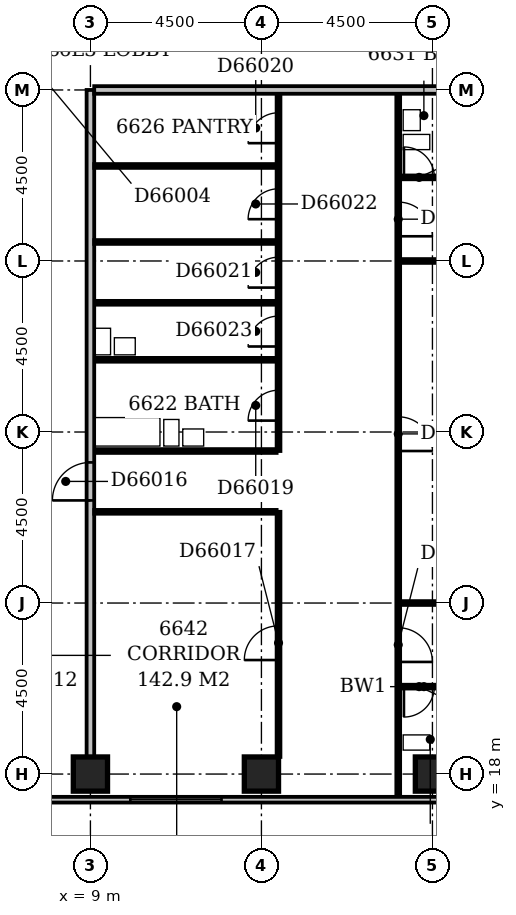
"""IFC4 building model, lengths in metres.
Left out: names, types, materials, properties, quantities, classifications, styles, units other than length and angle.
Written with IfcOpenShell. Run it as: python <this file> out.ifc"""

import sys

from ifc_helpers import new_model, si_unit, direction, frame, frame_2d, origin, origin_2d, place, context, subcontext, project, spatial, rectangle, extrude, element, fill, save


model = new_model("IFC4")
c1 = context("Model", 3, precision=1e-05, world=origin(), true_north=direction((0.0, 1.0)))
c2 = subcontext(c1, "Body", "Model", "MODEL_VIEW")
j1 = project(units=[si_unit("LENGTHUNIT", "METRE"), si_unit("PLANEANGLEUNIT", "RADIAN")], contexts=[c1])
p1 = place(None, origin())
s1 = spatial("IfcSite", under=j1, at=p1, CompositionType="ELEMENT")
p2 = place(p1, origin())
s2 = spatial("IfcBuilding", under=s1, at=p2, CompositionType="ELEMENT")
p3 = place(p2, frame((0.0, 0.0, 254.6)))
s3 = spatial("IfcBuildingStorey", under=s2, at=p3, CompositionType="ELEMENT", Elevation=254.6)
for number, where, z_axis, x_axis in (
    (1, (9.0, 18.0, -0.3), (0.0, 0.0, 1.0), (1.0, 0.0, 0.0)),
    (2, (13.5, 18.0, -0.3), (0.0, 0.0, 1.0), (1.0, 0.0, 0.0)),
    (3, (18.0, 18.0, -0.3), (0.0, 0.0, 1.0), (1.0, 0.0, 0.0)),
):
    element("IfcColumn", number, at=place(p3, frame(where, z_axis=z_axis, x_axis=x_axis)), inside=s3, PredefinedType="COLUMN", context=c2, shape_type="SweptSolid", body=[
        extrude(rectangle(XDim=0.9, YDim=0.9, at=origin_2d()), origin(), (0.0, 0.0, 1.0), 3.45),
    ])
p4 = place(p3, frame((3.9, 17.325, 0.0), z_axis=(0.0, 0.0, 1.0), x_axis=(1.0, 0.0, 0.0)))
e4 = element("IfcWall", 4, at=p4, inside=s3, PredefinedType="STANDARD", context=c2, shape_type="SweptSolid", body=[
    extrude(rectangle(XDim=19.35, YDim=0.15, at=frame_2d((9.675, 0.0))), origin(), (0.0, 0.0, 1.0), 2.7),
])
p5 = place(p4, frame((6.15, 0.0, 0.6)))
e5 = element("IfcOpeningElement", 5, at=p5, cuts=e4, PredefinedType="OPENING", context=c2, shape_type="SweptSolid", body=[
    extrude(rectangle(XDim=2.4, YDim=1.8, at=frame_2d((1.2, 0.9))), frame((0.0, 0.087, 0.0), z_axis=(0.0, -1.0, 0.0), x_axis=(1.0, 0.0, 0.0)), (0.0, 0.0, 1.0), 0.174),
])
p6 = place(p4, frame((15.15, 0.0, 0.6)))
e6 = element("IfcOpeningElement", 6, at=p6, cuts=e4, PredefinedType="OPENING", context=c2, shape_type="SweptSolid", body=[
    extrude(rectangle(XDim=2.4, YDim=1.8, at=frame_2d((1.2, 0.9))), frame((0.0, 0.087, 0.0), z_axis=(0.0, -1.0, 0.0), x_axis=(1.0, 0.0, 0.0)), (0.0, 0.0, 1.0), 0.174),
])
p7 = place(p3, frame((17.1, 17.4, 0.0), z_axis=(0.0, 0.0, 1.0), x_axis=(0.0, 1.0, 0.0)))
e7 = element("IfcWall", 7, at=p7, inside=s3, PredefinedType="PARTITIONING", context=c2, shape_type="SweptSolid", body=[
    extrude(rectangle(XDim=18.5, YDim=0.1, at=frame_2d((9.25, 0.0))), origin(), (0.0, 0.0, 1.0), 3.15),
])
p8 = place(p7, frame((3.55, 0.0, 0.0)))
e8 = element("IfcOpeningElement", 8, at=p8, cuts=e7, PredefinedType="OPENING", context=c2, shape_type="SweptSolid", body=[
    extrude(rectangle(XDim=0.9, YDim=2.1, at=frame_2d((0.45, 1.05))), frame((0.0, 0.062, 0.0), z_axis=(0.0, -1.0, 0.0), x_axis=(1.0, 0.0, 0.0)), (0.0, 0.0, 1.0), 0.124),
])
p9 = place(p7, frame((9.1, 0.0, 0.0)))
e9 = element("IfcOpeningElement", 9, at=p9, cuts=e7, PredefinedType="OPENING", context=c2, shape_type="SweptSolid", body=[
    extrude(rectangle(XDim=0.9, YDim=2.1, at=frame_2d((0.45, 1.05))), frame((0.0, 0.062, 0.0), z_axis=(0.0, -1.0, 0.0), x_axis=(1.0, 0.0, 0.0)), (0.0, 0.0, 1.0), 0.124),
])
p10 = place(p7, frame((14.75, 0.0, 0.0)))
e10 = element("IfcOpeningElement", 10, at=p10, cuts=e7, PredefinedType="OPENING", context=c2, shape_type="SweptSolid", body=[
    extrude(rectangle(XDim=0.9, YDim=2.1, at=frame_2d((0.45, 1.05))), frame((0.0, 0.062, 0.0), z_axis=(0.0, -1.0, 0.0), x_axis=(1.0, 0.0, 0.0)), (0.0, 0.0, 1.0), 0.124),
])
p11 = place(p3, frame((9.0, 18.45, 0.0), z_axis=(0.0, 0.0, 1.0), x_axis=(0.0, 1.0, 0.0)))
e11 = element("IfcWall", 11, at=p11, inside=s3, PredefinedType="PARTITIONING", context=c2, shape_type="SweptSolid", body=[
    extrude(rectangle(XDim=17.55, YDim=0.2, at=frame_2d((8.775, 0.0))), origin(), (0.0, 0.0, 1.0), 3.15),
])
p12 = place(p11, frame((6.75, 0.0, 0.0)))
e12 = element("IfcOpeningElement", 12, at=p12, cuts=e11, PredefinedType="OPENING", context=c2, shape_type="SweptSolid", body=[
    extrude(rectangle(XDim=1.0, YDim=2.1, at=frame_2d((0.5, 1.05))), frame((0.0, 0.112, 0.0), z_axis=(0.0, -1.0, 0.0), x_axis=(1.0, 0.0, 0.0)), (0.0, 0.0, 1.0), 0.224),
])
p13 = place(p3, frame((13.95, 18.45, 0.0), z_axis=(0.0, 0.0, 1.0), x_axis=(0.0, 1.0, 0.0)))
e13 = element("IfcWall", 13, at=p13, inside=s3, PredefinedType="PARTITIONING", context=c2, shape_type="SweptSolid", body=[
    extrude(rectangle(XDim=6.45, YDim=0.1, at=frame_2d((3.225, 0.0))), origin(), (0.0, 0.0, 1.0), 3.15),
])
p14 = place(p13, frame((2.55, 0.0, 0.0)))
e14 = element("IfcOpeningElement", 14, at=p14, cuts=e13, PredefinedType="OPENING", context=c2, shape_type="SweptSolid", body=[
    extrude(rectangle(XDim=0.9, YDim=2.1, at=frame_2d((0.45, 1.05))), frame((0.0, 0.062, 0.0), z_axis=(0.0, -1.0, 0.0), x_axis=(1.0, 0.0, 0.0)), (0.0, 0.0, 1.0), 0.124),
])
p15 = place(p3, frame((17.15, 20.3, 0.0), z_axis=(0.0, 0.0, 1.0), x_axis=(1.0, 0.0, 0.0)))
e15 = element("IfcWall", 15, at=p15, inside=s3, PredefinedType="PLUMBINGWALL", context=c2, shape_type="SweptSolid", body=[
    extrude(rectangle(XDim=1.25, YDim=0.1, at=frame_2d((0.625, 0.0))), origin(), (0.0, 0.0, 1.0), 3.15),
])
p16 = place(p15, frame((0.1, 0.0, 0.0)))
e16 = element("IfcOpeningElement", 16, at=p16, cuts=e15, PredefinedType="OPENING", context=c2, shape_type="SweptSolid", body=[
    extrude(rectangle(XDim=0.8, YDim=2.1, at=frame_2d((0.4, 1.05))), frame((0.0, 0.062, 0.0), z_axis=(0.0, -1.0, 0.0), x_axis=(1.0, 0.0, 0.0)), (0.0, 0.0, 1.0), 0.124),
])
p17 = place(p3, frame((17.15, 22.5, 0.0), z_axis=(0.0, 0.0, 1.0), x_axis=(1.0, 0.0, 0.0)))
e17 = element("IfcWall", 17, at=p17, inside=s3, PredefinedType="PARTITIONING", context=c2, shape_type="SweptSolid", body=[
    extrude(rectangle(XDim=4.9, YDim=0.1, at=frame_2d((2.45, 0.0))), origin(), (0.0, 0.0, 1.0), 3.15),
])
p18 = place(p3, frame((9.1, 24.9, 0.0), z_axis=(0.0, 0.0, 1.0), x_axis=(1.0, 0.0, 0.0)))
e18 = element("IfcWall", 18, at=p18, inside=s3, PredefinedType="PARTITIONING", context=c2, shape_type="SweptSolid", body=[
    extrude(rectangle(XDim=4.8, YDim=0.1, at=frame_2d((2.4, 0.0))), origin(), (0.0, 0.0, 1.0), 3.15),
])
p19 = place(p3, frame((9.1, 26.5, 0.0), z_axis=(0.0, 0.0, 1.0), x_axis=(1.0, 0.0, 0.0)))
e19 = element("IfcWall", 19, at=p19, inside=s3, PredefinedType="PLUMBINGWALL", context=c2, shape_type="SweptSolid", body=[
    extrude(rectangle(XDim=4.8, YDim=0.1, at=frame_2d((2.4, 0.0))), origin(), (0.0, 0.0, 1.0), 2.55),
])
p20 = place(p3, frame((13.95, 26.5, 0.0), z_axis=(0.0, 0.0, 1.0), x_axis=(0.0, 1.0, 0.0)))
e20 = element("IfcWall", 20, at=p20, inside=s3, PredefinedType="PARTITIONING", context=c2, shape_type="SweptSolid", body=[
    extrude(rectangle(XDim=9.4, YDim=0.1, at=frame_2d((4.7, 0.0))), origin(), (0.0, 0.0, 1.0), 3.15),
])
p21 = place(p20, frame((0.8, 0.0, 0.0)))
e21 = element("IfcOpeningElement", 21, at=p21, cuts=e20, PredefinedType="OPENING", context=c2, shape_type="SweptSolid", body=[
    extrude(rectangle(XDim=0.8, YDim=2.1, at=frame_2d((0.4, 1.05))), frame((0.0, 0.062, 0.0), z_axis=(0.0, -1.0, 0.0), x_axis=(1.0, 0.0, 0.0)), (0.0, 0.0, 1.0), 0.124),
])
p22 = place(p20, frame((8.1, 0.0, 0.0)))
e22 = element("IfcOpeningElement", 22, at=p22, cuts=e20, PredefinedType="OPENING", context=c2, shape_type="SweptSolid", body=[
    extrude(rectangle(XDim=0.8, YDim=2.1, at=frame_2d((0.4, 1.05))), frame((0.0, 0.062, 0.0), z_axis=(0.0, -1.0, 0.0), x_axis=(1.0, 0.0, 0.0)), (0.0, 0.0, 1.0), 0.124),
])
p23 = place(p20, frame((4.3, 0.0, 0.0)))
e23 = element("IfcOpeningElement", 23, at=p23, cuts=e20, PredefinedType="OPENING", context=c2, shape_type="SweptSolid", body=[
    extrude(rectangle(XDim=0.8, YDim=2.1, at=frame_2d((0.4, 1.05))), frame((0.0, 0.062, 0.0), z_axis=(0.0, -1.0, 0.0), x_axis=(1.0, 0.0, 0.0)), (0.0, 0.0, 1.0), 0.124),
])
p24 = place(p20, frame((6.1, 0.0, 0.0)))
e24 = element("IfcOpeningElement", 24, at=p24, cuts=e20, PredefinedType="OPENING", context=c2, shape_type="SweptSolid", body=[
    extrude(rectangle(XDim=0.8, YDim=2.1, at=frame_2d((0.4, 1.05))), frame((0.0, 0.062, 0.0), z_axis=(0.0, -1.0, 0.0), x_axis=(1.0, 0.0, 0.0)), (0.0, 0.0, 1.0), 0.124),
])
p25 = place(p20, frame((2.75, 0.0, 0.0)))
e25 = element("IfcOpeningElement", 25, at=p25, cuts=e20, PredefinedType="OPENING", context=c2, shape_type="SweptSolid", body=[
    extrude(rectangle(XDim=0.8, YDim=2.1, at=frame_2d((0.4, 1.05))), frame((0.0, 0.062, 0.0), z_axis=(0.0, -1.0, 0.0), x_axis=(1.0, 0.0, 0.0)), (0.0, 0.0, 1.0), 0.124),
])
for number, where, z_axis, x_axis in (
    (26, (9.1, 28.9, 0.0), (0.0, 0.0, 1.0), (1.0, 0.0, 0.0)),
    (27, (9.1, 30.4, 0.0), (0.0, 0.0, 1.0), (1.0, 0.0, 0.0)),
):
    element("IfcWall", number, at=place(p3, frame(where, z_axis=z_axis, x_axis=x_axis)), inside=s3, PredefinedType="PLUMBINGWALL", context=c2, shape_type="SweptSolid", body=[
        extrude(rectangle(XDim=4.8, YDim=0.1, at=frame_2d((2.4, 0.0))), origin(), (0.0, 0.0, 1.0), 3.15),
    ])
p26 = place(p3, frame((17.15, 31.5, 0.0), z_axis=(0.0, 0.0, 1.0), x_axis=(1.0, 0.0, 0.0)))
e28 = element("IfcWall", 28, at=p26, inside=s3, PredefinedType="PARTITIONING", context=c2, shape_type="SweptSolid", body=[
    extrude(rectangle(XDim=4.9, YDim=0.1, at=frame_2d((2.45, 0.0))), origin(), (0.0, 0.0, 1.0), 3.15),
])
p27 = place(p3, frame((9.1, 32.0, 0.0), z_axis=(0.0, 0.0, 1.0), x_axis=(1.0, 0.0, 0.0)))
e29 = element("IfcWall", 29, at=p27, inside=s3, PredefinedType="PARTITIONING", context=c2, shape_type="SweptSolid", body=[
    extrude(rectangle(XDim=4.8, YDim=0.1, at=frame_2d((2.4, 0.0))), origin(), (0.0, 0.0, 1.0), 3.15),
])
p28 = place(p3, frame((17.15, 33.7, 0.0), z_axis=(0.0, 0.0, 1.0), x_axis=(1.0, 0.0, 0.0)))
e30 = element("IfcWall", 30, at=p28, inside=s3, PredefinedType="PLUMBINGWALL", context=c2, shape_type="SweptSolid", body=[
    extrude(rectangle(XDim=1.25, YDim=0.1, at=frame_2d((0.625, 0.0))), origin(), (0.0, 0.0, 1.0), 3.15),
])
p29 = place(p28, frame((0.1, 0.0, 0.0)))
e31 = element("IfcOpeningElement", 31, at=p29, cuts=e30, PredefinedType="OPENING", context=c2, shape_type="SweptSolid", body=[
    extrude(rectangle(XDim=0.8, YDim=2.1, at=frame_2d((0.4, 1.05))), frame((0.0, 0.062, 0.0), z_axis=(0.0, -1.0, 0.0), x_axis=(1.0, 0.0, 0.0)), (0.0, 0.0, 1.0), 0.124),
])
p30 = place(p3, frame((9.1, 34.0, 0.0), z_axis=(0.0, 0.0, 1.0), x_axis=(1.0, 0.0, 0.0)))
e32 = element("IfcWall", 32, at=p30, inside=s3, PredefinedType="PARTITIONING", context=c2, shape_type="SweptSolid", body=[
    extrude(rectangle(XDim=4.8, YDim=0.1, at=frame_2d((2.4, 0.0))), origin(), (0.0, 0.0, 1.0), 3.15),
])
p31 = place(p3, frame((9.1, 36.0, 0.0), z_axis=(0.0, 0.0, 1.0), x_axis=(1.0, 0.0, 0.0)))
e33 = element("IfcWall", 33, at=p31, inside=s3, PredefinedType="PARTITIONING", context=c2, shape_type="SweptSolid", body=[
    extrude(rectangle(XDim=12.95, YDim=0.2, at=frame_2d((6.475, 0.0))), origin(), (0.0, 0.0, 1.0), 3.15),
])
p32 = place(p5, origin())
e34 = element("IfcWindow", 34, at=p32, inside=s3, PartitioningType="SINGLE_PANEL", PredefinedType="WINDOW", context=c2, shape_type="SweptSolid", body=[
    extrude(rectangle(XDim=2.4, YDim=1.8, at=frame_2d((1.2, 0.9))), frame((0.0, 0.03, 0.0), z_axis=(0.0, -1.0, 0.0), x_axis=(1.0, 0.0, 0.0)), (0.0, 0.0, 1.0), 0.06),
])
fill(e5, e34)
p33 = place(p8, frame((0.9, 0.0, 0.0), z_axis=(0.0, 0.0, 1.0), x_axis=(-1.0, 0.0, 0.0)))
e35 = element("IfcDoor", 35, at=p33, inside=s3, OperationType="SINGLE_SWING_RIGHT", PredefinedType="DOOR", context=c2, shape_type="SweptSolid", body=[
    extrude(rectangle(XDim=0.9, YDim=2.1, at=frame_2d((0.45, 1.05))), frame((0.0, 0.025, 0.0), z_axis=(0.0, -1.0, 0.0), x_axis=(1.0, 0.0, 0.0)), (0.0, 0.0, 1.0), 0.05),
])
fill(e8, e35)
p34 = place(p9, frame((0.9, 0.0, 0.0), z_axis=(0.0, 0.0, 1.0), x_axis=(-1.0, 0.0, 0.0)))
e36 = element("IfcDoor", 36, at=p34, inside=s3, OperationType="SINGLE_SWING_RIGHT", PredefinedType="DOOR", context=c2, shape_type="SweptSolid", body=[
    extrude(rectangle(XDim=0.9, YDim=2.1, at=frame_2d((0.45, 1.05))), frame((0.0, 0.025, 0.0), z_axis=(0.0, -1.0, 0.0), x_axis=(1.0, 0.0, 0.0)), (0.0, 0.0, 1.0), 0.05),
])
fill(e9, e36)
p35 = place(p10, frame((0.9, 0.0, 0.0), z_axis=(0.0, 0.0, 1.0), x_axis=(-1.0, 0.0, 0.0)))
e37 = element("IfcDoor", 37, at=p35, inside=s3, OperationType="SINGLE_SWING_RIGHT", PredefinedType="DOOR", context=c2, shape_type="SweptSolid", body=[
    extrude(rectangle(XDim=0.9, YDim=2.1, at=frame_2d((0.45, 1.05))), frame((0.0, 0.025, 0.0), z_axis=(0.0, -1.0, 0.0), x_axis=(1.0, 0.0, 0.0)), (0.0, 0.0, 1.0), 0.05),
])
fill(e10, e37)
p36 = place(p12, origin())
e38 = element("IfcDoor", 38, at=p36, inside=s3, OperationType="SINGLE_SWING_LEFT", PredefinedType="DOOR", context=c2, shape_type="SweptSolid", body=[
    extrude(rectangle(XDim=1.0, YDim=2.1, at=frame_2d((0.5, 1.05))), frame((0.0, 0.025, 0.0), z_axis=(0.0, -1.0, 0.0), x_axis=(1.0, 0.0, 0.0)), (0.0, 0.0, 1.0), 0.05),
])
fill(e12, e38)
p37 = place(p14, origin())
e39 = element("IfcDoor", 39, at=p37, inside=s3, OperationType="SINGLE_SWING_LEFT", PredefinedType="DOOR", context=c2, shape_type="SweptSolid", body=[
    extrude(rectangle(XDim=0.9, YDim=2.1, at=frame_2d((0.45, 1.05))), frame((0.0, 0.025, 0.0), z_axis=(0.0, -1.0, 0.0), x_axis=(1.0, 0.0, 0.0)), (0.0, 0.0, 1.0), 0.05),
])
fill(e14, e39)
p38 = place(p16, frame((0.8, 0.0, 0.0), z_axis=(0.0, 0.0, 1.0), x_axis=(-1.0, 0.0, 0.0)))
e40 = element("IfcDoor", 40, at=p38, inside=s3, OperationType="SINGLE_SWING_RIGHT", PredefinedType="DOOR", context=c2, shape_type="SweptSolid", body=[
    extrude(rectangle(XDim=0.8, YDim=2.1, at=frame_2d((0.4, 1.05))), frame((0.0, 0.025, 0.0), z_axis=(0.0, -1.0, 0.0), x_axis=(1.0, 0.0, 0.0)), (0.0, 0.0, 1.0), 0.05),
])
fill(e16, e40)
p39 = place(p21, origin())
e41 = element("IfcDoor", 41, at=p39, inside=s3, OperationType="SINGLE_SWING_LEFT", PredefinedType="DOOR", context=c2, shape_type="SweptSolid", body=[
    extrude(rectangle(XDim=0.8, YDim=2.1, at=frame_2d((0.4, 1.05))), frame((0.0, 0.025, 0.0), z_axis=(0.0, -1.0, 0.0), x_axis=(1.0, 0.0, 0.0)), (0.0, 0.0, 1.0), 0.05),
])
fill(e21, e41)
p40 = place(p22, origin())
e42 = element("IfcDoor", 42, at=p40, inside=s3, OperationType="SINGLE_SWING_LEFT", PredefinedType="DOOR", context=c2, shape_type="SweptSolid", body=[
    extrude(rectangle(XDim=0.8, YDim=2.1, at=frame_2d((0.4, 1.05))), frame((0.0, 0.025, 0.0), z_axis=(0.0, -1.0, 0.0), x_axis=(1.0, 0.0, 0.0)), (0.0, 0.0, 1.0), 0.05),
])
fill(e22, e42)
p41 = place(p23, origin())
e43 = element("IfcDoor", 43, at=p41, inside=s3, OperationType="SINGLE_SWING_LEFT", PredefinedType="DOOR", context=c2, shape_type="SweptSolid", body=[
    extrude(rectangle(XDim=0.8, YDim=2.1, at=frame_2d((0.4, 1.05))), frame((0.0, 0.025, 0.0), z_axis=(0.0, -1.0, 0.0), x_axis=(1.0, 0.0, 0.0)), (0.0, 0.0, 1.0), 0.05),
])
fill(e23, e43)
p42 = place(p24, origin())
e44 = element("IfcDoor", 44, at=p42, inside=s3, OperationType="SINGLE_SWING_LEFT", PredefinedType="DOOR", context=c2, shape_type="SweptSolid", body=[
    extrude(rectangle(XDim=0.8, YDim=2.1, at=frame_2d((0.4, 1.05))), frame((0.0, 0.025, 0.0), z_axis=(0.0, -1.0, 0.0), x_axis=(1.0, 0.0, 0.0)), (0.0, 0.0, 1.0), 0.05),
])
fill(e24, e44)
p43 = place(p25, origin())
e45 = element("IfcDoor", 45, at=p43, inside=s3, OperationType="SINGLE_SWING_LEFT", PredefinedType="DOOR", context=c2, shape_type="SweptSolid", body=[
    extrude(rectangle(XDim=0.8, YDim=2.1, at=frame_2d((0.4, 1.05))), frame((0.0, 0.025, 0.0), z_axis=(0.0, -1.0, 0.0), x_axis=(1.0, 0.0, 0.0)), (0.0, 0.0, 1.0), 0.05),
])
fill(e25, e45)
p44 = place(p29, origin())
e46 = element("IfcDoor", 46, at=p44, inside=s3, OperationType="SINGLE_SWING_LEFT", PredefinedType="DOOR", context=c2, shape_type="SweptSolid", body=[
    extrude(rectangle(XDim=0.8, YDim=2.1, at=frame_2d((0.4, 1.05))), frame((0.0, 0.025, 0.0), z_axis=(0.0, -1.0, 0.0), x_axis=(1.0, 0.0, 0.0)), (0.0, 0.0, 1.0), 0.05),
])
fill(e31, e46)
save(model, sys.argv[1])
